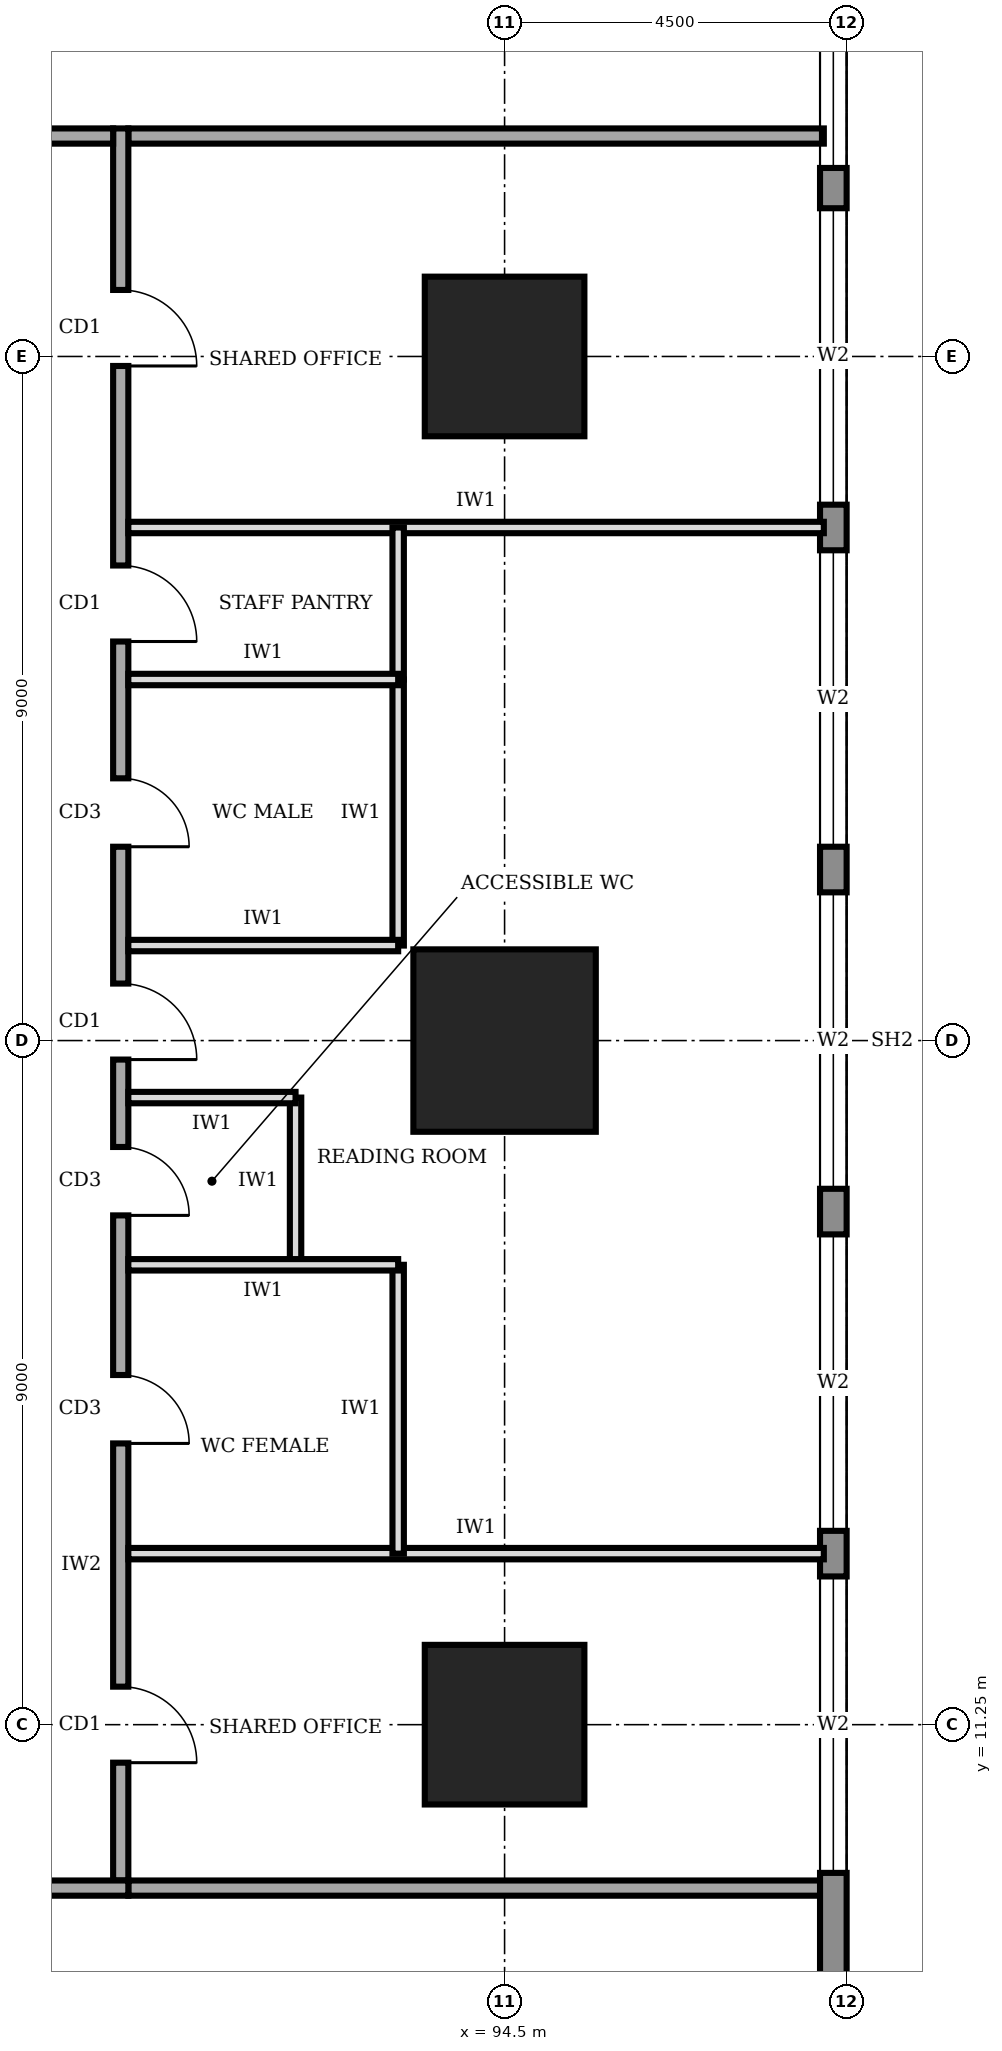
"""IFC4 building model, lengths in metres.
Left out: names, types, materials, properties, quantities, classifications, styles, units other than length and angle.
Written with IfcOpenShell. Run it as: python <this file> out.ifc"""

import sys

from ifc_helpers import new_model, si_unit, direction, frame, frame_2d, origin, origin_2d, place, context, subcontext, project, spatial, rectangle, extrude, element, fill, save


model = new_model("IFC4")
c1 = context("Model", 3, precision=1e-05, world=origin(), true_north=direction((0.0, 1.0)))
c2 = subcontext(c1, "Body", "Model", "MODEL_VIEW")
j1 = project(units=[si_unit("LENGTHUNIT", "METRE"), si_unit("PLANEANGLEUNIT", "RADIAN")], contexts=[c1])
p1 = place(None, origin())
s1 = spatial("IfcSite", under=j1, at=p1, CompositionType="ELEMENT")
p2 = place(p1, origin())
s2 = spatial("IfcBuilding", under=s1, at=p2, CompositionType="ELEMENT")
p3 = place(p2, frame((0.0, 0.0, 57.0)))
s3 = spatial("IfcBuildingStorey", under=s2, at=p3, CompositionType="ELEMENT", Elevation=57.0)
p4 = place(p3, frame((94.5, 11.25, 0.0), z_axis=(0.0, 0.0, 1.0), x_axis=(1.0, 0.0, 0.0)))
e1 = element("IfcColumn", 1, at=p4, inside=s3, PredefinedType="COLUMN", context=c2, shape_type="SweptSolid", body=[
    extrude(rectangle(XDim=2.1, YDim=2.1, at=origin_2d()), origin(), (0.0, 0.0, 1.0), 4.0),
])
p5 = place(p3, frame((94.5, 20.25, 0.0), z_axis=(0.0, 0.0, 1.0), x_axis=(1.0, 0.0, 0.0)))
e2 = element("IfcColumn", 2, at=p5, inside=s3, PredefinedType="COLUMN", context=c2, shape_type="SweptSolid", body=[
    extrude(rectangle(XDim=2.4, YDim=2.4, at=origin_2d()), origin(), (0.0, 0.0, 1.0), 4.0),
])
p6 = place(p3, frame((94.5, 29.25, 0.0), z_axis=(0.0, 0.0, 1.0), x_axis=(1.0, 0.0, 0.0)))
e3 = element("IfcColumn", 3, at=p6, inside=s3, PredefinedType="COLUMN", context=c2, shape_type="SweptSolid", body=[
    extrude(rectangle(XDim=2.1, YDim=2.1, at=origin_2d()), origin(), (0.0, 0.0, 1.0), 4.0),
])
p7 = place(p3, frame((98.825, 4.52, 0.0), z_axis=(0.0, 0.0, 1.0), x_axis=(0.0, 1.0, 0.0)))
e4 = element("IfcWall", 4, at=p7, inside=s3, PredefinedType="STANDARD", context=c2, shape_type="SweptSolid", body=[
    extrude(rectangle(XDim=31.46, YDim=0.35, at=frame_2d((15.73, 0.0))), origin(), (0.0, 0.0, 1.0), 3.75),
])
p8 = place(p7, frame((4.78, 0.0, 0.6)))
e5 = element("IfcOpeningElement", 5, at=p8, cuts=e4, PredefinedType="OPENING", context=c2, shape_type="SweptSolid", body=[
    extrude(rectangle(XDim=3.9, YDim=2.6, at=frame_2d((1.95, 1.3))), frame((0.0, 0.185, 0.0), z_axis=(0.0, -1.0, 0.0), x_axis=(1.0, 0.0, 0.0)), (0.0, 0.0, 1.0), 0.37),
])
p9 = place(p7, frame((9.28, 0.0, 0.6)))
e6 = element("IfcOpeningElement", 6, at=p9, cuts=e4, PredefinedType="OPENING", context=c2, shape_type="SweptSolid", body=[
    extrude(rectangle(XDim=3.9, YDim=2.6, at=frame_2d((1.95, 1.3))), frame((0.0, 0.185, 0.0), z_axis=(0.0, -1.0, 0.0), x_axis=(1.0, 0.0, 0.0)), (0.0, 0.0, 1.0), 0.37),
])
p10 = place(p7, frame((13.78, 0.0, 0.6)))
e7 = element("IfcOpeningElement", 7, at=p10, cuts=e4, PredefinedType="OPENING", context=c2, shape_type="SweptSolid", body=[
    extrude(rectangle(XDim=3.9, YDim=2.6, at=frame_2d((1.95, 1.3))), frame((0.0, 0.185, 0.0), z_axis=(0.0, -1.0, 0.0), x_axis=(1.0, 0.0, 0.0)), (0.0, 0.0, 1.0), 0.37),
])
p11 = place(p7, frame((18.28, 0.0, 0.6)))
e8 = element("IfcOpeningElement", 8, at=p11, cuts=e4, PredefinedType="OPENING", context=c2, shape_type="SweptSolid", body=[
    extrude(rectangle(XDim=3.9, YDim=2.6, at=frame_2d((1.95, 1.3))), frame((0.0, 0.185, 0.0), z_axis=(0.0, -1.0, 0.0), x_axis=(1.0, 0.0, 0.0)), (0.0, 0.0, 1.0), 0.37),
])
p12 = place(p7, frame((22.78, 0.0, 0.6)))
e9 = element("IfcOpeningElement", 9, at=p12, cuts=e4, PredefinedType="OPENING", context=c2, shape_type="SweptSolid", body=[
    extrude(rectangle(XDim=3.9, YDim=2.6, at=frame_2d((1.95, 1.3))), frame((0.0, 0.185, 0.0), z_axis=(0.0, -1.0, 0.0), x_axis=(1.0, 0.0, 0.0)), (0.0, 0.0, 1.0), 0.37),
])
p13 = place(p7, frame((27.21, 0.0, 0.6)))
e10 = element("IfcOpeningElement", 10, at=p13, cuts=e4, PredefinedType="OPENING", context=c2, shape_type="SweptSolid", body=[
    extrude(rectangle(XDim=3.9, YDim=2.6, at=frame_2d((1.95, 1.3))), frame((0.0, 0.185, 0.0), z_axis=(0.0, -1.0, 0.0), x_axis=(1.0, 0.0, 0.0)), (0.0, 0.0, 1.0), 0.37),
])
p14 = place(p3, frame((71.9, 9.1, 0.0), z_axis=(0.0, 0.0, 1.0), x_axis=(1.0, 0.0, 0.0)))
e11 = element("IfcWall", 11, at=p14, inside=s3, PredefinedType="SOLIDWALL", context=c2, shape_type="SweptSolid", body=[
    extrude(rectangle(XDim=17.65, YDim=0.2, at=frame_2d((8.825, 0.0))), origin(), (0.0, 0.0, 1.0), 3.75),
])
p15 = place(p14, frame((5.8, 0.0, 0.0)))
e12 = element("IfcOpeningElement", 12, at=p15, cuts=e11, PredefinedType="OPENING", context=c2, shape_type="SweptSolid", body=[
    extrude(rectangle(XDim=1.8, YDim=2.1, at=frame_2d((0.9, 1.05))), frame((0.0, 0.11, 0.0), z_axis=(0.0, -1.0, 0.0), x_axis=(1.0, 0.0, 0.0)), (0.0, 0.0, 1.0), 0.22),
])
p16 = place(p14, frame((14.725, 0.0, 0.0)))
e13 = element("IfcOpeningElement", 13, at=p16, cuts=e11, PredefinedType="OPENING", context=c2, shape_type="SweptSolid", body=[
    extrude(rectangle(XDim=1.8, YDim=2.1, at=frame_2d((0.9, 1.05))), frame((0.0, 0.11, 0.0), z_axis=(0.0, -1.0, 0.0), x_axis=(1.0, 0.0, 0.0)), (0.0, 0.0, 1.0), 0.22),
])
p17 = place(p3, frame((89.45, 9.2, 0.0), z_axis=(0.0, 0.0, 1.0), x_axis=(0.0, 1.0, 0.0)))
e14 = element("IfcWall", 14, at=p17, inside=s3, PredefinedType="SOLIDWALL", context=c2, shape_type="SweptSolid", body=[
    extrude(rectangle(XDim=23.05, YDim=0.2, at=frame_2d((11.525, 0.0))), origin(), (0.0, 0.0, 1.0), 3.75),
])
p18 = place(p17, frame((1.55, 0.0, 0.0)))
e15 = element("IfcOpeningElement", 15, at=p18, cuts=e14, PredefinedType="OPENING", context=c2, shape_type="SweptSolid", body=[
    extrude(rectangle(XDim=1.0, YDim=2.1, at=frame_2d((0.5, 1.05))), frame((0.0, 0.11, 0.0), z_axis=(0.0, -1.0, 0.0), x_axis=(1.0, 0.0, 0.0)), (0.0, 0.0, 1.0), 0.22),
])
p19 = place(p17, frame((5.75, 0.0, 0.0)))
e16 = element("IfcOpeningElement", 16, at=p19, cuts=e14, PredefinedType="OPENING", context=c2, shape_type="SweptSolid", body=[
    extrude(rectangle(XDim=0.9, YDim=2.1, at=frame_2d((0.45, 1.05))), frame((0.0, 0.11, 0.0), z_axis=(0.0, -1.0, 0.0), x_axis=(1.0, 0.0, 0.0)), (0.0, 0.0, 1.0), 0.22),
])
p20 = place(p17, frame((8.75, 0.0, 0.0)))
e17 = element("IfcOpeningElement", 17, at=p20, cuts=e14, PredefinedType="OPENING", context=c2, shape_type="SweptSolid", body=[
    extrude(rectangle(XDim=0.9, YDim=2.1, at=frame_2d((0.45, 1.05))), frame((0.0, 0.11, 0.0), z_axis=(0.0, -1.0, 0.0), x_axis=(1.0, 0.0, 0.0)), (0.0, 0.0, 1.0), 0.22),
])
p21 = place(p17, frame((13.6, 0.0, 0.0)))
e18 = element("IfcOpeningElement", 18, at=p21, cuts=e14, PredefinedType="OPENING", context=c2, shape_type="SweptSolid", body=[
    extrude(rectangle(XDim=0.9, YDim=2.1, at=frame_2d((0.45, 1.05))), frame((0.0, 0.11, 0.0), z_axis=(0.0, -1.0, 0.0), x_axis=(1.0, 0.0, 0.0)), (0.0, 0.0, 1.0), 0.22),
])
p22 = place(p17, frame((16.3, 0.0, 0.0)))
e19 = element("IfcOpeningElement", 19, at=p22, cuts=e14, PredefinedType="OPENING", context=c2, shape_type="SweptSolid", body=[
    extrude(rectangle(XDim=1.0, YDim=2.1, at=frame_2d((0.5, 1.05))), frame((0.0, 0.11, 0.0), z_axis=(0.0, -1.0, 0.0), x_axis=(1.0, 0.0, 0.0)), (0.0, 0.0, 1.0), 0.22),
])
p23 = place(p17, frame((10.8, 0.0, 0.0)))
e20 = element("IfcOpeningElement", 20, at=p23, cuts=e14, PredefinedType="OPENING", context=c2, shape_type="SweptSolid", body=[
    extrude(rectangle(XDim=1.0, YDim=2.1, at=frame_2d((0.5, 1.05))), frame((0.0, 0.11, 0.0), z_axis=(0.0, -1.0, 0.0), x_axis=(1.0, 0.0, 0.0)), (0.0, 0.0, 1.0), 0.22),
])
p24 = place(p17, frame((19.925, 0.0, 0.0)))
e21 = element("IfcOpeningElement", 21, at=p24, cuts=e14, PredefinedType="OPENING", context=c2, shape_type="SweptSolid", body=[
    extrude(rectangle(XDim=1.0, YDim=2.1, at=frame_2d((0.5, 1.05))), frame((0.0, 0.11, 0.0), z_axis=(0.0, -1.0, 0.0), x_axis=(1.0, 0.0, 0.0)), (0.0, 0.0, 1.0), 0.22),
])
p25 = place(p3, frame((89.35, 32.15, 0.0), z_axis=(0.0, 0.0, 1.0), x_axis=(-1.0, 0.0, 0.0)))
e22 = element("IfcWall", 22, at=p25, inside=s3, PredefinedType="SOLIDWALL", context=c2, shape_type="SweptSolid", body=[
    extrude(rectangle(XDim=17.65, YDim=0.2, at=frame_2d((8.825, 0.0))), origin(), (0.0, 0.0, 1.0), 3.75),
])
p26 = place(p25, frame((14.75, 0.0, 0.0)))
e23 = element("IfcOpeningElement", 23, at=p26, cuts=e22, PredefinedType="OPENING", context=c2, shape_type="SweptSolid", body=[
    extrude(rectangle(XDim=1.0, YDim=2.1, at=frame_2d((0.5, 1.05))), frame((0.0, 0.11, 0.0), z_axis=(0.0, -1.0, 0.0), x_axis=(1.0, 0.0, 0.0)), (0.0, 0.0, 1.0), 0.22),
])
p27 = place(p25, frame((7.85, 0.0, 0.0)))
e24 = element("IfcOpeningElement", 24, at=p27, cuts=e22, PredefinedType="OPENING", context=c2, shape_type="SweptSolid", body=[
    extrude(rectangle(XDim=1.0, YDim=2.1, at=frame_2d((0.5, 1.05))), frame((0.0, 0.11, 0.0), z_axis=(0.0, -1.0, 0.0), x_axis=(1.0, 0.0, 0.0)), (0.0, 0.0, 1.0), 0.22),
])
p28 = place(p25, frame((1.325, 0.0, 0.0)))
e25 = element("IfcOpeningElement", 25, at=p28, cuts=e22, PredefinedType="OPENING", context=c2, shape_type="SweptSolid", body=[
    extrude(rectangle(XDim=1.0, YDim=2.1, at=frame_2d((0.5, 1.05))), frame((0.0, 0.11, 0.0), z_axis=(0.0, -1.0, 0.0), x_axis=(1.0, 0.0, 0.0)), (0.0, 0.0, 1.0), 0.22),
])
for number, where, z_axis, x_axis in (
    (26, (89.55, 9.1, 0.0), (0.0, 0.0, 1.0), (1.0, 0.0, 0.0)),
    (27, (89.55, 32.15, 0.0), (0.0, 0.0, 1.0), (1.0, 0.0, 0.0)),
):
    element("IfcWall", number, at=place(p3, frame(where, z_axis=z_axis, x_axis=x_axis)), inside=s3, PredefinedType="SOLIDWALL", context=c2, shape_type="SweptSolid", body=[
        extrude(rectangle(XDim=9.15, YDim=0.2, at=frame_2d((4.575, 0.0))), origin(), (0.0, 0.0, 1.0), 3.75),
    ])
for number, where, z_axis, x_axis in (
    (28, (89.55, 13.5, 0.0), (0.0, 0.0, 1.0), (1.0, 0.0, 0.0)),
    (29, (89.55, 27.0, 0.0), (0.0, 0.0, 1.0), (1.0, 0.0, 0.0)),
):
    element("IfcWall", number, at=place(p3, frame(where, z_axis=z_axis, x_axis=x_axis)), inside=s3, PredefinedType="PARTITIONING", context=c2, shape_type="SweptSolid", body=[
        extrude(rectangle(XDim=9.15, YDim=0.15, at=frame_2d((4.575, 0.0))), origin(), (0.0, 0.0, 1.0), 3.75),
    ])
p29 = place(p3, frame((89.55, 17.3, 0.0), z_axis=(0.0, 0.0, 1.0), x_axis=(1.0, 0.0, 0.0)))
e30 = element("IfcWall", 30, at=p29, inside=s3, PredefinedType="PARTITIONING", context=c2, shape_type="SweptSolid", body=[
    extrude(rectangle(XDim=3.55, YDim=0.15, at=frame_2d((1.775, 0.0))), origin(), (0.0, 0.0, 1.0), 3.75),
])
p30 = place(p3, frame((89.55, 19.5, 0.0), z_axis=(0.0, 0.0, 1.0), x_axis=(1.0, 0.0, 0.0)))
e31 = element("IfcWall", 31, at=p30, inside=s3, PredefinedType="PARTITIONING", context=c2, shape_type="SweptSolid", body=[
    extrude(rectangle(XDim=2.2, YDim=0.15, at=frame_2d((1.1, 0.0))), origin(), (0.0, 0.0, 1.0), 2.85),
])
for number, where, z_axis, x_axis in (
    (32, (89.55, 21.5, 0.0), (0.0, 0.0, 1.0), (1.0, 0.0, 0.0)),
    (33, (89.55, 25.0, 0.0), (0.0, 0.0, 1.0), (1.0, 0.0, 0.0)),
):
    element("IfcWall", number, at=place(p3, frame(where, z_axis=z_axis, x_axis=x_axis)), inside=s3, PredefinedType="PARTITIONING", context=c2, shape_type="SweptSolid", body=[
        extrude(rectangle(XDim=3.55, YDim=0.15, at=frame_2d((1.775, 0.0))), origin(), (0.0, 0.0, 1.0), 3.75),
    ])
p31 = place(p3, frame((93.1, 13.5, 0.0), z_axis=(0.0, 0.0, 1.0), x_axis=(0.0, 1.0, 0.0)))
e34 = element("IfcWall", 34, at=p31, inside=s3, PredefinedType="PARTITIONING", context=c2, shape_type="SweptSolid", body=[
    extrude(rectangle(XDim=3.8, YDim=0.15, at=frame_2d((1.9, 0.0))), origin(), (0.0, 0.0, 1.0), 3.75),
])
p32 = place(p3, frame((91.75, 17.3, 0.0), z_axis=(0.0, 0.0, 1.0), x_axis=(0.0, 1.0, 0.0)))
e35 = element("IfcWall", 35, at=p32, inside=s3, PredefinedType="PARTITIONING", context=c2, shape_type="SweptSolid", body=[
    extrude(rectangle(XDim=2.2, YDim=0.15, at=frame_2d((1.1, 0.0))), origin(), (0.0, 0.0, 1.0), 3.75),
])
p33 = place(p3, frame((93.1, 21.5, 0.0), z_axis=(0.0, 0.0, 1.0), x_axis=(0.0, 1.0, 0.0)))
e36 = element("IfcWall", 36, at=p33, inside=s3, PredefinedType="PARTITIONING", context=c2, shape_type="SweptSolid", body=[
    extrude(rectangle(XDim=3.5, YDim=0.15, at=frame_2d((1.75, 0.0))), origin(), (0.0, 0.0, 1.0), 3.75),
])
p34 = place(p3, frame((93.1, 25.0, 0.0), z_axis=(0.0, 0.0, 1.0), x_axis=(0.0, 1.0, 0.0)))
e37 = element("IfcWall", 37, at=p34, inside=s3, PredefinedType="PARTITIONING", context=c2, shape_type="SweptSolid", body=[
    extrude(rectangle(XDim=2.0, YDim=0.15, at=frame_2d((1.0, 0.0))), origin(), (0.0, 0.0, 1.0), 3.75),
])
p35 = place(p8, origin())
e38 = element("IfcWindow", 38, at=p35, inside=s3, PartitioningType="SINGLE_PANEL", PredefinedType="WINDOW", context=c2, shape_type="SweptSolid", body=[
    extrude(rectangle(XDim=3.9, YDim=2.6, at=frame_2d((1.95, 1.3))), frame((0.0, 0.03, 0.0), z_axis=(0.0, -1.0, 0.0), x_axis=(1.0, 0.0, 0.0)), (0.0, 0.0, 1.0), 0.06),
])
fill(e5, e38)
p36 = place(p9, origin())
e39 = element("IfcWindow", 39, at=p36, inside=s3, PartitioningType="SINGLE_PANEL", PredefinedType="WINDOW", context=c2, shape_type="SweptSolid", body=[
    extrude(rectangle(XDim=3.9, YDim=2.6, at=frame_2d((1.95, 1.3))), frame((0.0, 0.03, 0.0), z_axis=(0.0, -1.0, 0.0), x_axis=(1.0, 0.0, 0.0)), (0.0, 0.0, 1.0), 0.06),
])
fill(e6, e39)
p37 = place(p10, origin())
e40 = element("IfcWindow", 40, at=p37, inside=s3, PartitioningType="SINGLE_PANEL", PredefinedType="WINDOW", context=c2, shape_type="SweptSolid", body=[
    extrude(rectangle(XDim=3.9, YDim=2.6, at=frame_2d((1.95, 1.3))), frame((0.0, 0.03, 0.0), z_axis=(0.0, -1.0, 0.0), x_axis=(1.0, 0.0, 0.0)), (0.0, 0.0, 1.0), 0.06),
])
fill(e7, e40)
p38 = place(p11, origin())
e41 = element("IfcWindow", 41, at=p38, inside=s3, PartitioningType="SINGLE_PANEL", PredefinedType="WINDOW", context=c2, shape_type="SweptSolid", body=[
    extrude(rectangle(XDim=3.9, YDim=2.6, at=frame_2d((1.95, 1.3))), frame((0.0, 0.03, 0.0), z_axis=(0.0, -1.0, 0.0), x_axis=(1.0, 0.0, 0.0)), (0.0, 0.0, 1.0), 0.06),
])
fill(e8, e41)
p39 = place(p12, origin())
e42 = element("IfcWindow", 42, at=p39, inside=s3, PartitioningType="SINGLE_PANEL", PredefinedType="WINDOW", context=c2, shape_type="SweptSolid", body=[
    extrude(rectangle(XDim=3.9, YDim=2.6, at=frame_2d((1.95, 1.3))), frame((0.0, 0.03, 0.0), z_axis=(0.0, -1.0, 0.0), x_axis=(1.0, 0.0, 0.0)), (0.0, 0.0, 1.0), 0.06),
])
fill(e9, e42)
p40 = place(p13, origin())
e43 = element("IfcWindow", 43, at=p40, inside=s3, PartitioningType="SINGLE_PANEL", PredefinedType="WINDOW", context=c2, shape_type="SweptSolid", body=[
    extrude(rectangle(XDim=3.9, YDim=2.6, at=frame_2d((1.95, 1.3))), frame((0.0, 0.03, 0.0), z_axis=(0.0, -1.0, 0.0), x_axis=(1.0, 0.0, 0.0)), (0.0, 0.0, 1.0), 0.06),
])
fill(e10, e43)
p41 = place(p18, frame((1.0, 0.0, 0.0), z_axis=(0.0, 0.0, 1.0), x_axis=(-1.0, 0.0, 0.0)))
e44 = element("IfcDoor", 44, at=p41, inside=s3, OperationType="SINGLE_SWING_RIGHT", PredefinedType="DOOR", context=c2, shape_type="SweptSolid", body=[
    extrude(rectangle(XDim=1.0, YDim=2.1, at=frame_2d((0.5, 1.05))), frame((0.0, 0.025, 0.0), z_axis=(0.0, -1.0, 0.0), x_axis=(1.0, 0.0, 0.0)), (0.0, 0.0, 1.0), 0.05),
])
fill(e15, e44)
p42 = place(p19, frame((0.9, 0.0, 0.0), z_axis=(0.0, 0.0, 1.0), x_axis=(-1.0, 0.0, 0.0)))
e45 = element("IfcDoor", 45, at=p42, inside=s3, OperationType="SINGLE_SWING_RIGHT", PredefinedType="DOOR", context=c2, shape_type="SweptSolid", body=[
    extrude(rectangle(XDim=0.9, YDim=2.1, at=frame_2d((0.45, 1.05))), frame((0.0, 0.025, 0.0), z_axis=(0.0, -1.0, 0.0), x_axis=(1.0, 0.0, 0.0)), (0.0, 0.0, 1.0), 0.05),
])
fill(e16, e45)
p43 = place(p20, frame((0.9, 0.0, 0.0), z_axis=(0.0, 0.0, 1.0), x_axis=(-1.0, 0.0, 0.0)))
e46 = element("IfcDoor", 46, at=p43, inside=s3, OperationType="SINGLE_SWING_RIGHT", PredefinedType="DOOR", context=c2, shape_type="SweptSolid", body=[
    extrude(rectangle(XDim=0.9, YDim=2.1, at=frame_2d((0.45, 1.05))), frame((0.0, 0.025, 0.0), z_axis=(0.0, -1.0, 0.0), x_axis=(1.0, 0.0, 0.0)), (0.0, 0.0, 1.0), 0.05),
])
fill(e17, e46)
p44 = place(p21, frame((0.9, 0.0, 0.0), z_axis=(0.0, 0.0, 1.0), x_axis=(-1.0, 0.0, 0.0)))
e47 = element("IfcDoor", 47, at=p44, inside=s3, OperationType="SINGLE_SWING_RIGHT", PredefinedType="DOOR", context=c2, shape_type="SweptSolid", body=[
    extrude(rectangle(XDim=0.9, YDim=2.1, at=frame_2d((0.45, 1.05))), frame((0.0, 0.025, 0.0), z_axis=(0.0, -1.0, 0.0), x_axis=(1.0, 0.0, 0.0)), (0.0, 0.0, 1.0), 0.05),
])
fill(e18, e47)
p45 = place(p22, frame((1.0, 0.0, 0.0), z_axis=(0.0, 0.0, 1.0), x_axis=(-1.0, 0.0, 0.0)))
e48 = element("IfcDoor", 48, at=p45, inside=s3, OperationType="SINGLE_SWING_RIGHT", PredefinedType="DOOR", context=c2, shape_type="SweptSolid", body=[
    extrude(rectangle(XDim=1.0, YDim=2.1, at=frame_2d((0.5, 1.05))), frame((0.0, 0.025, 0.0), z_axis=(0.0, -1.0, 0.0), x_axis=(1.0, 0.0, 0.0)), (0.0, 0.0, 1.0), 0.05),
])
fill(e19, e48)
p46 = place(p23, frame((1.0, 0.0, 0.0), z_axis=(0.0, 0.0, 1.0), x_axis=(-1.0, 0.0, 0.0)))
e49 = element("IfcDoor", 49, at=p46, inside=s3, OperationType="SINGLE_SWING_RIGHT", PredefinedType="DOOR", context=c2, shape_type="SweptSolid", body=[
    extrude(rectangle(XDim=1.0, YDim=2.1, at=frame_2d((0.5, 1.05))), frame((0.0, 0.025, 0.0), z_axis=(0.0, -1.0, 0.0), x_axis=(1.0, 0.0, 0.0)), (0.0, 0.0, 1.0), 0.05),
])
fill(e20, e49)
p47 = place(p24, frame((1.0, 0.0, 0.0), z_axis=(0.0, 0.0, 1.0), x_axis=(-1.0, 0.0, 0.0)))
e50 = element("IfcDoor", 50, at=p47, inside=s3, OperationType="SINGLE_SWING_RIGHT", PredefinedType="DOOR", context=c2, shape_type="SweptSolid", body=[
    extrude(rectangle(XDim=1.0, YDim=2.1, at=frame_2d((0.5, 1.05))), frame((0.0, 0.025, 0.0), z_axis=(0.0, -1.0, 0.0), x_axis=(1.0, 0.0, 0.0)), (0.0, 0.0, 1.0), 0.05),
])
fill(e21, e50)
save(model, sys.argv[1])
